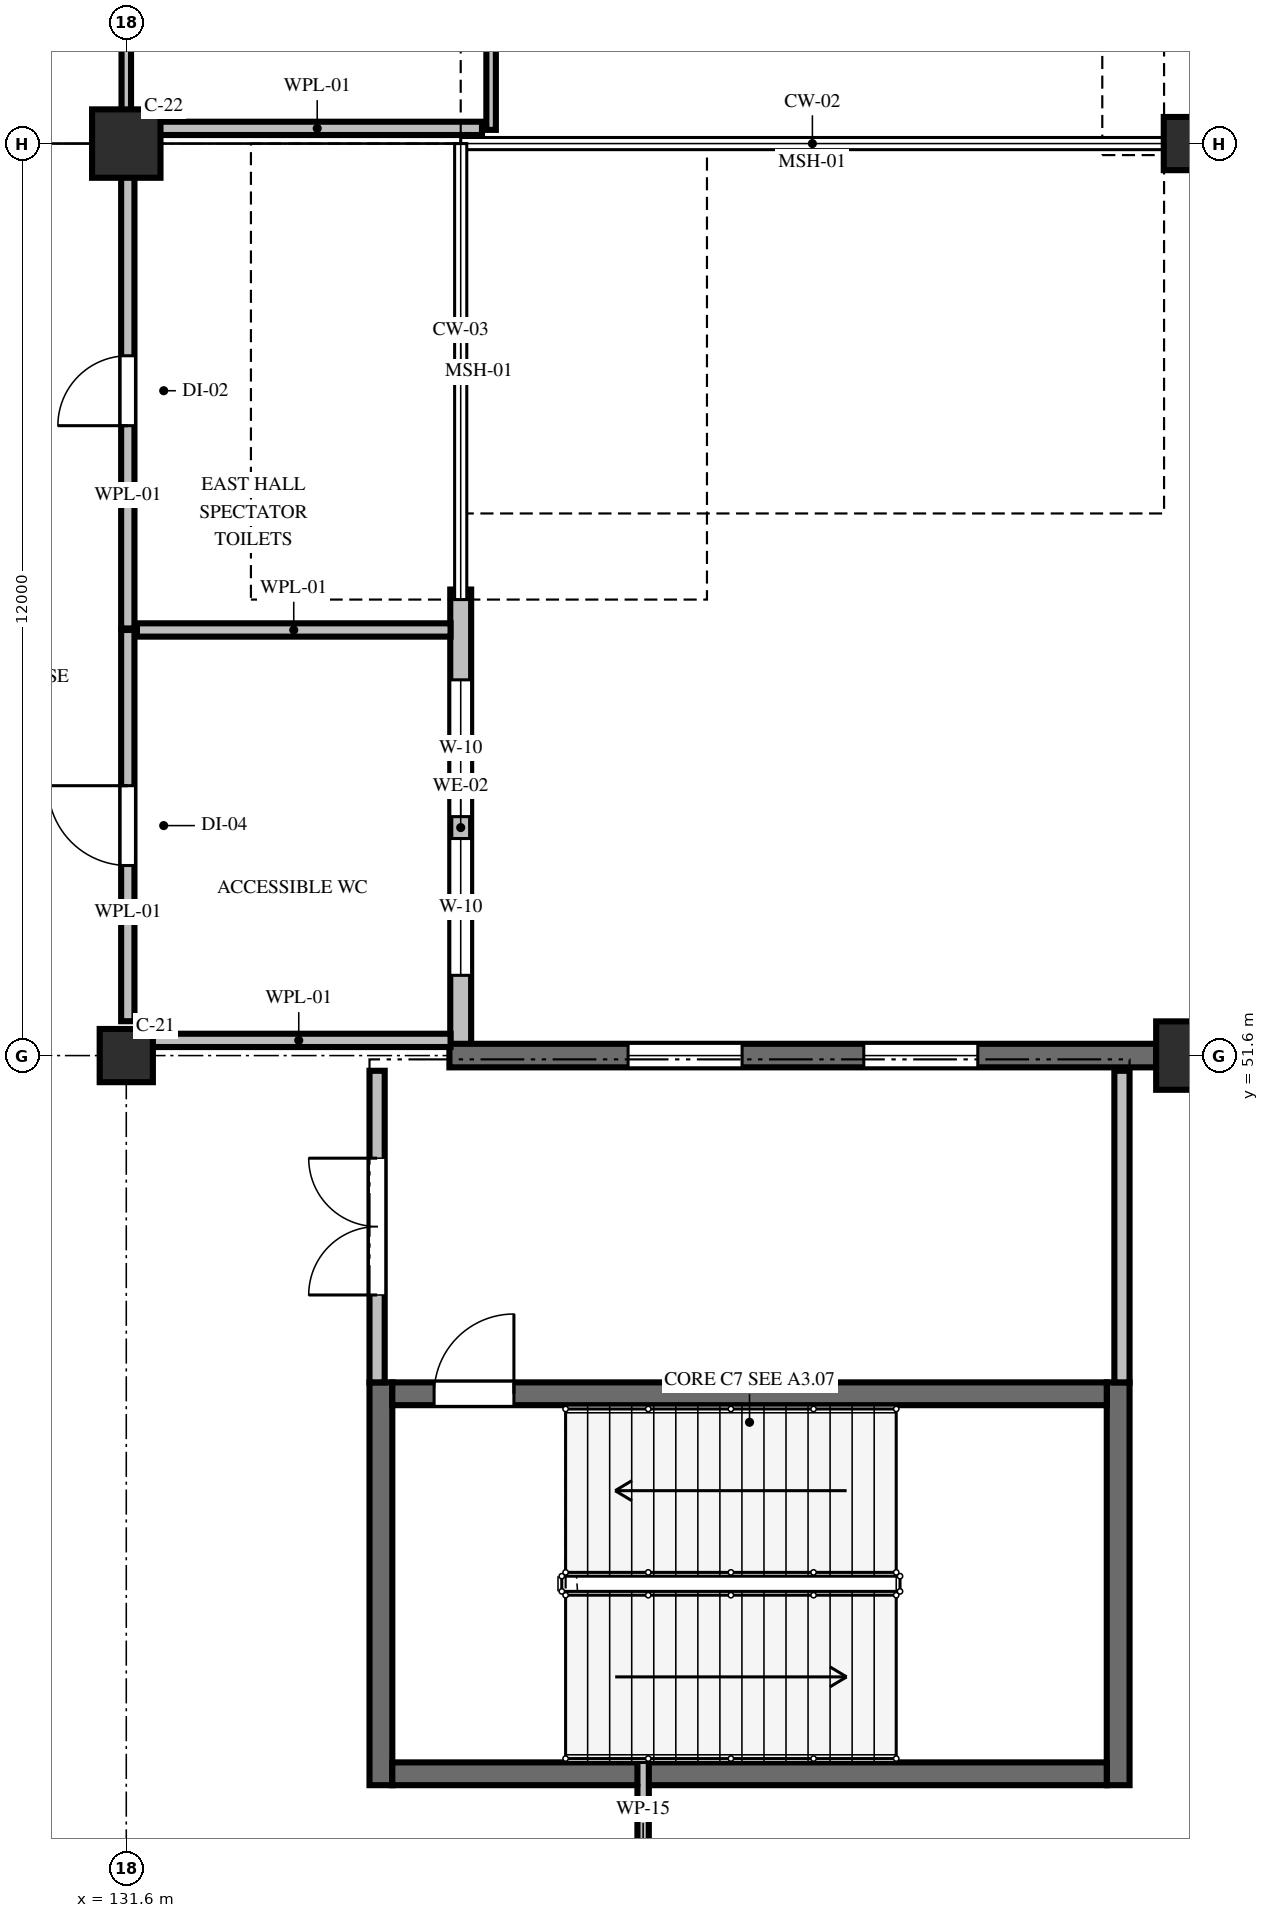
"""IFC4 building model, lengths in metres.
Left out: names, types, materials, properties, quantities, classifications, styles, units other than length and angle.
Written with IfcOpenShell. Run it as: python <this file> out.ifc"""

import sys

from ifc_helpers import new_model, si_unit, direction, frame, frame_2d, origin, origin_2d, place, context, subcontext, project, spatial, rectangle, hollow_rectangle, extrude, element, fill, save


model = new_model("IFC4")
c1 = context("Model", 3, precision=1e-05, world=origin(), true_north=direction((0.0, 1.0)))
c2 = subcontext(c1, "Body", "Model", "MODEL_VIEW")
j1 = project(units=[si_unit("LENGTHUNIT", "METRE"), si_unit("PLANEANGLEUNIT", "RADIAN")], contexts=[c1])
p1 = place(None, origin())
s1 = spatial("IfcSite", under=j1, at=p1, CompositionType="ELEMENT")
p2 = place(p1, origin())
s2 = spatial("IfcBuilding", under=s1, at=p2, CompositionType="ELEMENT")
p3 = place(p2, frame((0.0, 0.0, 16.8)))
s3 = spatial("IfcBuildingStorey", under=s2, at=p3, CompositionType="ELEMENT", Elevation=16.8)
p4 = place(p3, frame((131.6, 51.6, 0.0), z_axis=(0.0, 0.0, 1.0), x_axis=(1.0, 0.0, 0.0)))
e1 = element("IfcColumn", 1, at=p4, inside=s3, PredefinedType="COLUMN", context=c2, shape_type="SweptSolid", body=[
    extrude(hollow_rectangle(XDim=0.7, YDim=0.7, WallThickness=0.028, InnerFilletRadius=0.028, OuterFilletRadius=0.056, at=origin_2d()), origin(), (0.0, 0.0, 1.0), 5.4),
])
for number, where, z_axis, x_axis in (
    (2, (131.6, 63.6, 0.0), (0.0, 0.0, 1.0), (1.0, 0.0, 0.0)),
    (3, (145.6, 51.6, 0.0), (0.0, 0.0, 1.0), (1.0, 0.0, 0.0)),
):
    element("IfcColumn", number, at=place(p3, frame(where, z_axis=z_axis, x_axis=x_axis)), inside=s3, PredefinedType="COLUMN", context=c2, shape_type="SweptSolid", body=[
        extrude(hollow_rectangle(XDim=0.9, YDim=0.9, WallThickness=0.036, InnerFilletRadius=0.036, OuterFilletRadius=0.072, at=origin_2d()), origin(), (0.0, 0.0, 1.0), 5.4),
    ])
p5 = place(p3, frame((145.6, 63.6, 0.0), z_axis=(0.0, 0.0, 1.0), x_axis=(1.0, 0.0, 0.0)))
e4 = element("IfcColumn", 4, at=p5, inside=s3, PredefinedType="COLUMN", context=c2, shape_type="SweptSolid", body=[
    extrude(hollow_rectangle(XDim=0.7, YDim=0.7, WallThickness=0.028, InnerFilletRadius=0.028, OuterFilletRadius=0.056, at=origin_2d()), origin(), (0.0, 0.0, 1.0), 5.4),
])
p6 = place(p3, frame((136.0, 57.732, 0.0), z_axis=(0.0, 0.0, 1.0), x_axis=(0.0, -1.0, 0.0)))
e5 = element("IfcWall", 5, at=p6, inside=s3, PredefinedType="SOLIDWALL", context=c2, shape_type="SweptSolid", body=[
    extrude(rectangle(XDim=6.264, YDim=0.275, at=frame_2d((3.132, 0.0))), origin(), (0.0, 0.0, 1.0), 3.508),
])
p7 = place(p6, frame((1.188, 0.0, 0.9)))
e6 = element("IfcOpeningElement", 6, at=p7, cuts=e5, PredefinedType="OPENING", context=c2, shape_type="SweptSolid", body=[
    extrude(rectangle(XDim=1.8, YDim=1.35, at=frame_2d((0.9, 0.675))), frame((0.0, 0.147, 0.0), z_axis=(0.0, -1.0, 0.0), x_axis=(1.0, 0.0, 0.0)), (0.0, 0.0, 1.0), 0.295),
])
p8 = place(p6, frame((3.276, 0.0, 0.9)))
e7 = element("IfcOpeningElement", 7, at=p8, cuts=e5, PredefinedType="OPENING", context=c2, shape_type="SweptSolid", body=[
    extrude(rectangle(XDim=1.8, YDim=1.35, at=frame_2d((0.9, 0.675))), frame((0.0, 0.147, 0.0), z_axis=(0.0, -1.0, 0.0), x_axis=(1.0, 0.0, 0.0)), (0.0, 0.0, 1.0), 0.295),
])
p9 = place(p3, frame((135.851, 51.6, 0.0), z_axis=(0.0, 0.0, 1.0), x_axis=(1.0, 0.0, 0.0)))
e8 = element("IfcWall", 8, at=p9, inside=s3, PredefinedType="SOLIDWALL", context=c2, shape_type="SweptSolid", body=[
    extrude(rectangle(XDim=9.303, YDim=0.31, at=frame_2d((4.651, 0.0))), origin(), (0.0, 0.0, 1.0), 3.508),
])
p10 = place(p9, frame((2.351, 0.0, 0.9)))
e9 = element("IfcOpeningElement", 9, at=p10, cuts=e8, PredefinedType="OPENING", context=c2, shape_type="SweptSolid", body=[
    extrude(rectangle(XDim=1.5, YDim=1.6, at=frame_2d((0.75, 0.8))), frame((0.0, 0.165, 0.0), z_axis=(0.0, -1.0, 0.0), x_axis=(1.0, 0.0, 0.0)), (0.0, 0.0, 1.0), 0.33),
])
p11 = place(p9, frame((5.452, 0.0, 0.9)))
e10 = element("IfcOpeningElement", 10, at=p11, cuts=e8, PredefinedType="OPENING", context=c2, shape_type="SweptSolid", body=[
    extrude(rectangle(XDim=1.5, YDim=1.6, at=frame_2d((0.75, 0.8))), frame((0.0, 0.165, 0.0), z_axis=(0.0, -1.0, 0.0), x_axis=(1.0, 0.0, 0.0)), (0.0, 0.0, 1.0), 0.33),
])
for number, where, z_axis, x_axis in (
    (11, (134.95, 42.0, 0.0), (0.0, 0.0, 1.0), (0.0, 1.0, 0.0)),
    (12, (144.65, 47.3, 0.0), (0.0, 0.0, 1.0), (0.0, -1.0, 0.0)),
):
    element("IfcWall", number, at=place(p3, frame(where, z_axis=z_axis, x_axis=x_axis)), inside=s3, PredefinedType="SHEAR", context=c2, shape_type="SweptSolid", body=[
        extrude(rectangle(XDim=5.3, YDim=0.3, at=frame_2d((2.65, 0.0))), origin(), (0.0, 0.0, 1.0), 5.15),
    ])
p12 = place(p3, frame((144.5, 42.15, 0.0), z_axis=(0.0, 0.0, 1.0), x_axis=(-1.0, 0.0, 0.0)))
e13 = element("IfcWall", 13, at=p12, inside=s3, PredefinedType="SHEAR", context=c2, shape_type="SweptSolid", body=[
    extrude(rectangle(XDim=9.4, YDim=0.3, at=frame_2d((4.7, 0.0))), origin(), (0.0, 0.0, 1.0), 5.15),
])
p13 = place(p3, frame((135.1, 47.15, 0.0), z_axis=(0.0, 0.0, 1.0), x_axis=(1.0, 0.0, 0.0)))
e14 = element("IfcWall", 14, at=p13, inside=s3, PredefinedType="SHEAR", context=c2, shape_type="SweptSolid", body=[
    extrude(rectangle(XDim=9.4, YDim=0.3, at=frame_2d((4.7, 0.0))), origin(), (0.0, 0.0, 1.0), 5.15),
])
p14 = place(p13, frame((0.55, 0.0, 0.0)))
e15 = element("IfcOpeningElement", 15, at=p14, cuts=e14, PredefinedType="OPENING", context=c2, shape_type="SweptSolid", body=[
    extrude(rectangle(XDim=1.05, YDim=2.2, at=frame_2d((0.525, 1.1))), frame((0.0, 0.16, 0.0), z_axis=(0.0, -1.0, 0.0), x_axis=(1.0, 0.0, 0.0)), (0.0, 0.0, 1.0), 0.32),
])
p15 = place(p3, frame((134.9, 47.3, 0.0), z_axis=(0.0, 0.0, 1.0), x_axis=(0.0, 1.0, 0.0)))
e16 = element("IfcWall", 16, at=p15, inside=s3, PredefinedType="SOLIDWALL", context=c2, shape_type="SweptSolid", body=[
    extrude(rectangle(XDim=4.1, YDim=0.2, at=frame_2d((2.05, 0.0))), origin(), (0.0, 0.0, 1.0), 5.03),
])
p16 = place(p15, frame((1.15, 0.0, 0.0)))
e17 = element("IfcOpeningElement", 17, at=p16, cuts=e16, PredefinedType="OPENING", context=c2, shape_type="SweptSolid", body=[
    extrude(rectangle(XDim=1.8, YDim=2.2, at=frame_2d((0.9, 1.1))), frame((0.0, 0.11, 0.0), z_axis=(0.0, -1.0, 0.0), x_axis=(1.0, 0.0, 0.0)), (0.0, 0.0, 1.0), 0.22),
])
p17 = place(p3, frame((144.7, 47.3, 0.0), z_axis=(0.0, 0.0, 1.0), x_axis=(0.0, 1.0, 0.0)))
e18 = element("IfcWall", 18, at=p17, inside=s3, PredefinedType="SOLIDWALL", context=c2, shape_type="SweptSolid", body=[
    extrude(rectangle(XDim=4.1, YDim=0.2, at=frame_2d((2.05, 0.0))), origin(), (0.0, 0.0, 1.0), 5.03),
])
p18 = place(p3, frame((136.4, 63.78, 0.0), z_axis=(0.0, 0.0, 1.0), x_axis=(0.0, 1.0, 0.0)))
e19 = element("IfcWall", 19, at=p18, inside=s3, PredefinedType="PARTITIONING", context=c2, shape_type="SweptSolid", body=[
    extrude(rectangle(XDim=6.8, YDim=0.125, at=frame_2d((3.4, 0.0))), origin(), (0.0, 0.0, 1.0), 3.51),
])
p19 = place(p3, frame((135.866, 51.8, 0.0), z_axis=(0.0, 0.0, 1.0), x_axis=(-1.0, 0.0, 0.0)))
e20 = element("IfcWall", 20, at=p19, inside=s3, PredefinedType="PLUMBINGWALL", context=c2, shape_type="SweptSolid", body=[
    extrude(rectangle(XDim=3.994, YDim=0.175, at=frame_2d((1.997, 0.0))), origin(), (0.0, 0.0, 1.0), 3.51),
])
p20 = place(p3, frame((131.62, 52.052, 0.0), z_axis=(0.0, 0.0, 1.0), x_axis=(0.0, 1.0, 0.0)))
e21 = element("IfcWall", 21, at=p20, inside=s3, PredefinedType="PLUMBINGWALL", context=c2, shape_type="SweptSolid", body=[
    extrude(rectangle(XDim=5.148, YDim=0.175, at=frame_2d((2.574, 0.0))), origin(), (0.0, 0.0, 1.0), 3.51),
])
p21 = place(p20, frame((2.049, 0.0, 0.0)))
e22 = element("IfcOpeningElement", 22, at=p21, cuts=e21, PredefinedType="OPENING", context=c2, shape_type="SweptSolid", body=[
    extrude(rectangle(XDim=1.05, YDim=2.15, at=frame_2d((0.525, 1.075))), frame((0.0, 0.097, 0.0), z_axis=(0.0, -1.0, 0.0), x_axis=(1.0, 0.0, 0.0)), (0.0, 0.0, 1.0), 0.195),
])
p22 = place(p3, frame((131.74, 57.2, 0.0), z_axis=(0.0, 0.0, 1.0), x_axis=(1.0, 0.0, 0.0)))
e23 = element("IfcWall", 23, at=p22, inside=s3, PredefinedType="PLUMBINGWALL", context=c2, shape_type="SweptSolid", body=[
    extrude(rectangle(XDim=4.126, YDim=0.175, at=frame_2d((2.063, 0.0))), origin(), (0.0, 0.0, 1.0), 4.318),
])
p23 = place(p3, frame((131.62, 57.22, 0.0), z_axis=(0.0, 0.0, 1.0), x_axis=(0.0, 1.0, 0.0)))
e24 = element("IfcWall", 24, at=p23, inside=s3, PredefinedType="PLUMBINGWALL", context=c2, shape_type="SweptSolid", body=[
    extrude(rectangle(XDim=6.256, YDim=0.175, at=frame_2d((3.128, 0.0))), origin(), (0.0, 0.0, 1.0), 3.51),
])
p24 = place(p23, frame((2.668, 0.0, 0.0)))
e25 = element("IfcOpeningElement", 25, at=p24, cuts=e24, PredefinedType="OPENING", context=c2, shape_type="SweptSolid", body=[
    extrude(rectangle(XDim=0.92, YDim=2.15, at=frame_2d((0.46, 1.075))), frame((0.0, 0.097, 0.0), z_axis=(0.0, -1.0, 0.0), x_axis=(1.0, 0.0, 0.0)), (0.0, 0.0, 1.0), 0.195),
])
p25 = place(p3, frame((131.944, 63.8, 0.0), z_axis=(0.0, 0.0, 1.0), x_axis=(1.0, 0.0, 0.0)))
e26 = element("IfcWall", 26, at=p25, inside=s3, PredefinedType="PLUMBINGWALL", context=c2, shape_type="SweptSolid", body=[
    extrude(rectangle(XDim=4.336, YDim=0.175, at=frame_2d((2.168, 0.0))), origin(), (0.0, 0.0, 1.0), 3.51),
])
p26 = place(p3, frame((131.6, 70.48, 0.0), z_axis=(0.0, 0.0, 1.0), x_axis=(0.0, -1.0, 0.0)))
e27 = element("IfcWall", 27, at=p26, inside=s3, PredefinedType="PARTITIONING", context=c2, shape_type="SweptSolid", body=[
    extrude(rectangle(XDim=7.0, YDim=0.125, at=frame_2d((3.5, 0.0))), origin(), (0.0, 0.0, 1.0), 3.51),
])
p27 = place(p3, frame((138.4, 42.324, 0.0), z_axis=(0.0, 0.0, 1.0), x_axis=(0.0, -1.0, 0.0)))
e28 = element("IfcWall", 28, at=p27, inside=s3, PredefinedType="PARTITIONING", context=c2, shape_type="SweptSolid", body=[
    extrude(rectangle(XDim=2.384, YDim=0.15, at=frame_2d((1.192, 0.0))), origin(), (0.0, 0.0, 1.0), 3.51),
])
p28 = place(p7, origin())
e29 = element("IfcWindow", 29, at=p28, inside=s3, PartitioningType="DOUBLE_PANEL_VERTICAL", PredefinedType="WINDOW", context=c2, shape_type="SweptSolid", body=[
    extrude(rectangle(XDim=1.8, YDim=1.35, at=frame_2d((0.9, 0.675))), frame((0.0, 0.03, 0.0), z_axis=(0.0, -1.0, 0.0), x_axis=(1.0, 0.0, 0.0)), (0.0, 0.0, 1.0), 0.06),
])
fill(e6, e29)
p29 = place(p8, origin())
e30 = element("IfcWindow", 30, at=p29, inside=s3, PartitioningType="DOUBLE_PANEL_VERTICAL", PredefinedType="WINDOW", context=c2, shape_type="SweptSolid", body=[
    extrude(rectangle(XDim=1.8, YDim=1.35, at=frame_2d((0.9, 0.675))), frame((0.0, 0.03, 0.0), z_axis=(0.0, -1.0, 0.0), x_axis=(1.0, 0.0, 0.0)), (0.0, 0.0, 1.0), 0.06),
])
fill(e7, e30)
p30 = place(p10, origin())
e31 = element("IfcWindow", 31, at=p30, inside=s3, PartitioningType="SINGLE_PANEL", PredefinedType="WINDOW", context=c2, shape_type="SweptSolid", body=[
    extrude(rectangle(XDim=1.5, YDim=1.6, at=frame_2d((0.75, 0.8))), frame((0.0, 0.03, 0.0), z_axis=(0.0, -1.0, 0.0), x_axis=(1.0, 0.0, 0.0)), (0.0, 0.0, 1.0), 0.06),
])
fill(e9, e31)
p31 = place(p11, origin())
e32 = element("IfcWindow", 32, at=p31, inside=s3, PartitioningType="SINGLE_PANEL", PredefinedType="WINDOW", context=c2, shape_type="SweptSolid", body=[
    extrude(rectangle(XDim=1.5, YDim=1.6, at=frame_2d((0.75, 0.8))), frame((0.0, 0.03, 0.0), z_axis=(0.0, -1.0, 0.0), x_axis=(1.0, 0.0, 0.0)), (0.0, 0.0, 1.0), 0.06),
])
fill(e10, e32)
p32 = place(p14, origin())
e33 = element("IfcDoor", 33, at=p32, inside=s3, OperationType="SINGLE_SWING_RIGHT", PredefinedType="DOOR", context=c2, shape_type="SweptSolid", body=[
    extrude(rectangle(XDim=1.05, YDim=2.2, at=frame_2d((0.525, 1.1))), frame((0.0, 0.025, 0.0), z_axis=(0.0, -1.0, 0.0), x_axis=(1.0, 0.0, 0.0)), (0.0, 0.0, 1.0), 0.05),
])
fill(e15, e33)
p33 = place(p16, origin())
e34 = element("IfcDoor", 34, at=p33, inside=s3, OperationType="DOUBLE_DOOR_SINGLE_SWING", PredefinedType="DOOR", context=c2, shape_type="SweptSolid", body=[
    extrude(rectangle(XDim=1.8, YDim=2.2, at=frame_2d((0.9, 1.1))), frame((0.0, 0.025, 0.0), z_axis=(0.0, -1.0, 0.0), x_axis=(1.0, 0.0, 0.0)), (0.0, 0.0, 1.0), 0.05),
])
fill(e17, e34)
p34 = place(p24, origin())
e35 = element("IfcDoor", 35, at=p34, inside=s3, OperationType="SINGLE_SWING_LEFT", PredefinedType="DOOR", context=c2, shape_type="SweptSolid", body=[
    extrude(rectangle(XDim=0.92, YDim=2.15, at=frame_2d((0.46, 1.075))), frame((0.0, 0.025, 0.0), z_axis=(0.0, -1.0, 0.0), x_axis=(1.0, 0.0, 0.0)), (0.0, 0.0, 1.0), 0.05),
])
fill(e25, e35)
p35 = place(p21, origin())
e36 = element("IfcDoor", 36, at=p35, inside=s3, OperationType="SINGLE_SWING_RIGHT", PredefinedType="DOOR", context=c2, shape_type="SweptSolid", body=[
    extrude(rectangle(XDim=1.05, YDim=2.15, at=frame_2d((0.525, 1.075))), frame((0.0, 0.025, 0.0), z_axis=(0.0, -1.0, 0.0), x_axis=(1.0, 0.0, 0.0)), (0.0, 0.0, 1.0), 0.05),
])
fill(e22, e36)
save(model, sys.argv[1])
